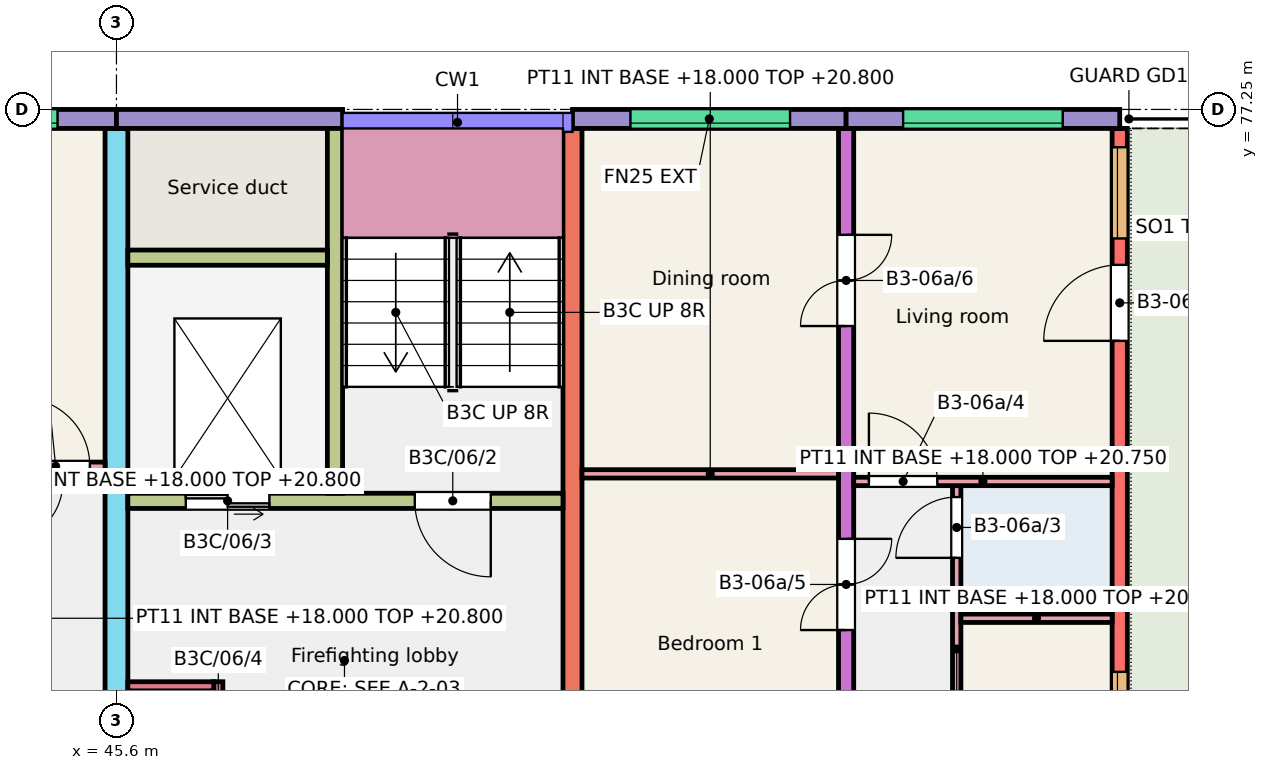
"""IFC4 building model, lengths in metres.
Left out: names, types, materials, properties, quantities, classifications, styles, units other than length and angle.
Written with IfcOpenShell. Run it as: python <this file> out.ifc"""

import sys

from ifc_helpers import new_model, si_unit, direction, frame, frame_2d, origin, place, context, subcontext, project, spatial, rectangle, extrude, element, fill, save


model = new_model("IFC4")
c1 = context("Model", 3, precision=1e-05, world=origin(), true_north=direction((0.0, 1.0)))
c2 = subcontext(c1, "Body", "Model", "MODEL_VIEW")
j1 = project(units=[si_unit("LENGTHUNIT", "METRE"), si_unit("PLANEANGLEUNIT", "RADIAN")], contexts=[c1])
p1 = place(None, origin())
s1 = spatial("IfcSite", under=j1, at=p1, CompositionType="ELEMENT")
p2 = place(p1, origin())
s2 = spatial("IfcBuilding", under=s1, at=p2, CompositionType="ELEMENT")
p3 = place(p2, frame((0.0, 0.0, 18.0)))
s3 = spatial("IfcBuildingStorey", under=s2, at=p3, CompositionType="ELEMENT", Elevation=18.0)
p4 = place(p3, frame((45.6, 66.0, 0.0), z_axis=(0.0, 0.0, 1.0), x_axis=(0.0, 1.0, 0.0)))
e1 = element("IfcWall", 1, at=p4, inside=s3, PredefinedType="SHEAR", context=c2, shape_type="SweptSolid", body=[
    extrude(rectangle(XDim=11.0, YDim=0.3, at=frame_2d((5.5, 0.0))), origin(), (0.0, 0.0, 1.0), 3.0),
])
p5 = place(p4, frame((0.3, 0.0, 0.0)))
e2 = element("IfcOpeningElement", 2, at=p5, cuts=e1, PredefinedType="OPENING", context=c2, shape_type="SweptSolid", body=[
    extrude(rectangle(XDim=1.2, YDim=2.1, at=frame_2d((0.6, 1.05))), frame((0.0, 0.16, 0.0), z_axis=(0.0, -1.0, 0.0), x_axis=(1.0, 0.0, 0.0)), (0.0, 0.0, 1.0), 0.32),
])
p6 = place(p3, frame((51.6, 68.0, 0.0), z_axis=(0.0, 0.0, 1.0), x_axis=(0.0, 1.0, 0.0)))
e3 = element("IfcWall", 3, at=p6, inside=s3, PredefinedType="SHEAR", context=c2, shape_type="SweptSolid", body=[
    extrude(rectangle(XDim=9.0, YDim=0.25, at=frame_2d((4.5, 0.0))), origin(), (0.0, 0.0, 1.0), 3.0),
])
p7 = place(p3, frame((55.2, 68.0, 0.0), z_axis=(0.0, 0.0, 1.0), x_axis=(0.0, 1.0, 0.0)))
e4 = element("IfcWall", 4, at=p7, inside=s3, PredefinedType="SHEAR", context=c2, shape_type="SweptSolid", body=[
    extrude(rectangle(XDim=9.0, YDim=0.2, at=frame_2d((4.5, 0.0))), origin(), (0.0, 0.0, 1.0), 3.0),
])
p8 = place(p7, frame((2.4, 0.0, 0.0)))
e5 = element("IfcOpeningElement", 5, at=p8, cuts=e4, PredefinedType="OPENING", context=c2, shape_type="SweptSolid", body=[
    extrude(rectangle(XDim=1.2, YDim=2.1, at=frame_2d((0.6, 1.05))), frame((0.0, 0.11, 0.0), z_axis=(0.0, -1.0, 0.0), x_axis=(1.0, 0.0, 0.0)), (0.0, 0.0, 1.0), 0.22),
])
p9 = place(p7, frame((6.4, 0.0, 0.0)))
e6 = element("IfcOpeningElement", 6, at=p9, cuts=e4, PredefinedType="OPENING", context=c2, shape_type="SweptSolid", body=[
    extrude(rectangle(XDim=1.2, YDim=2.1, at=frame_2d((0.6, 1.05))), frame((0.0, 0.11, 0.0), z_axis=(0.0, -1.0, 0.0), x_axis=(1.0, 0.0, 0.0)), (0.0, 0.0, 1.0), 0.22),
])
p10 = place(p3, frame((58.8, 68.0, 0.0), z_axis=(0.0, 0.0, 1.0), x_axis=(0.0, 1.0, 0.0)))
e7 = element("IfcWall", 7, at=p10, inside=s3, PredefinedType="SHEAR", context=c2, shape_type="SweptSolid", body=[
    extrude(rectangle(XDim=9.0, YDim=0.2, at=frame_2d((4.5, 0.0))), origin(), (0.0, 0.0, 1.0), 3.0),
])
p11 = place(p10, frame((0.65, 0.0, 0.9)))
e8 = element("IfcOpeningElement", 8, at=p11, cuts=e7, PredefinedType="OPENING", context=c2, shape_type="SweptSolid", body=[
    extrude(rectangle(XDim=1.2, YDim=1.5, at=frame_2d((0.6, 0.75))), frame((0.0, 0.11, 0.0), z_axis=(0.0, -1.0, 0.0), x_axis=(1.0, 0.0, 0.0)), (0.0, 0.0, 1.0), 0.22),
])
p12 = place(p10, frame((7.552, 0.0, 0.9)))
e9 = element("IfcOpeningElement", 9, at=p12, cuts=e7, PredefinedType="OPENING", context=c2, shape_type="SweptSolid", body=[
    extrude(rectangle(XDim=1.2, YDim=1.5, at=frame_2d((0.6, 0.75))), frame((0.0, 0.11, 0.0), z_axis=(0.0, -1.0, 0.0), x_axis=(1.0, 0.0, 0.0)), (0.0, 0.0, 1.0), 0.22),
])
p13 = place(p10, frame((6.205, 0.0, 0.0)))
e10 = element("IfcOpeningElement", 10, at=p13, cuts=e7, PredefinedType="OPENING", context=c2, shape_type="SweptSolid", body=[
    extrude(rectangle(XDim=1.0, YDim=2.1, at=frame_2d((0.5, 1.05))), frame((0.0, 0.11, 0.0), z_axis=(0.0, -1.0, 0.0), x_axis=(1.0, 0.0, 0.0)), (0.0, 0.0, 1.0), 0.22),
])
p14 = place(p3, frame((42.0, 77.125, 0.0), z_axis=(0.0, 0.0, 1.0), x_axis=(1.0, 0.0, 0.0)))
e11 = element("IfcWall", 11, at=p14, inside=s3, PredefinedType="SOLIDWALL", context=c2, shape_type="SweptSolid", body=[
    extrude(rectangle(XDim=3.6, YDim=0.25, at=frame_2d((1.8, 0.0))), origin(), (0.0, 0.0, 1.0), 3.0),
])
p15 = place(p14, frame((0.725, 0.0, 1.2)))
e12 = element("IfcOpeningElement", 12, at=p15, cuts=e11, PredefinedType="OPENING", context=c2, shape_type="SweptSolid", body=[
    extrude(rectangle(XDim=2.1, YDim=1.2, at=frame_2d((1.05, 0.6))), frame((0.0, 0.135, 0.0), z_axis=(0.0, -1.0, 0.0), x_axis=(1.0, 0.0, 0.0)), (0.0, 0.0, 1.0), 0.27),
])
p16 = place(p3, frame((45.6, 77.125, 0.0), z_axis=(0.0, 0.0, 1.0), x_axis=(1.0, 0.0, 0.0)))
e13 = element("IfcWall", 13, at=p16, inside=s3, PredefinedType="SOLIDWALL", context=c2, shape_type="SweptSolid", body=[
    extrude(rectangle(XDim=2.975, YDim=0.25, at=frame_2d((1.487, 0.0))), origin(), (0.0, 0.0, 1.0), 3.0),
])
p17 = place(p3, frame((45.75, 72.1, 0.0), z_axis=(0.0, 0.0, 1.0), x_axis=(1.0, 0.0, 0.0)))
e14 = element("IfcWall", 14, at=p17, inside=s3, PredefinedType="SHEAR", context=c2, shape_type="SweptSolid", body=[
    extrude(rectangle(XDim=5.725, YDim=0.2, at=frame_2d((2.863, 0.0))), origin(), (0.0, 0.0, 1.0), 3.0),
])
p18 = place(p17, frame((3.775, 0.0, 0.0)))
e15 = element("IfcOpeningElement", 15, at=p18, cuts=e14, PredefinedType="OPENING", context=c2, shape_type="SweptSolid", body=[
    extrude(rectangle(XDim=1.0, YDim=2.1, at=frame_2d((0.5, 1.05))), frame((0.0, 0.11, 0.0), z_axis=(0.0, -1.0, 0.0), x_axis=(1.0, 0.0, 0.0)), (0.0, 0.0, 1.0), 0.22),
])
p19 = place(p17, frame((0.762, 0.0, 0.0)))
e16 = element("IfcOpeningElement", 16, at=p19, cuts=e14, PredefinedType="OPENING", context=c2, shape_type="SweptSolid", body=[
    extrude(rectangle(XDim=1.1, YDim=2.1, at=frame_2d((0.55, 1.05))), frame((0.0, 0.11, 0.0), z_axis=(0.0, -1.0, 0.0), x_axis=(1.0, 0.0, 0.0)), (0.0, 0.0, 1.0), 0.22),
])
p20 = place(p3, frame((48.475, 72.2, 0.0), z_axis=(0.0, 0.0, 1.0), x_axis=(0.0, 1.0, 0.0)))
e17 = element("IfcWall", 17, at=p20, inside=s3, PredefinedType="SHEAR", context=c2, shape_type="SweptSolid", body=[
    extrude(rectangle(XDim=4.8, YDim=0.2, at=frame_2d((2.4, 0.0))), origin(), (0.0, 0.0, 1.0), 3.0),
])
p21 = place(p3, frame((45.75, 75.3, 0.0), z_axis=(0.0, 0.0, 1.0), x_axis=(1.0, 0.0, 0.0)))
e18 = element("IfcWall", 18, at=p21, inside=s3, PredefinedType="SHEAR", context=c2, shape_type="SweptSolid", body=[
    extrude(rectangle(XDim=2.625, YDim=0.2, at=frame_2d((1.312, 0.0))), origin(), (0.0, 0.0, 1.0), 3.0),
])
p22 = place(p3, frame((46.94, 68.0, 0.0), z_axis=(0.0, 0.0, 1.0), x_axis=(0.0, 1.0, 0.0)))
e19 = element("IfcWall", 19, at=p22, inside=s3, PredefinedType="SHEAR", context=c2, shape_type="SweptSolid", body=[
    extrude(rectangle(XDim=1.72, YDim=0.12, at=frame_2d((0.86, 0.0))), origin(), (0.0, 0.0, 1.0), 3.0),
])
p23 = place(p22, frame((0.45, 0.0, 0.0)))
e20 = element("IfcOpeningElement", 20, at=p23, cuts=e19, PredefinedType="OPENING", context=c2, shape_type="SweptSolid", body=[
    extrude(rectangle(XDim=0.9, YDim=2.1, at=frame_2d((0.45, 1.05))), frame((0.0, 0.07, 0.0), z_axis=(0.0, -1.0, 0.0), x_axis=(1.0, 0.0, 0.0)), (0.0, 0.0, 1.0), 0.14),
])
p24 = place(p3, frame((45.75, 69.66, 0.0), z_axis=(0.0, 0.0, 1.0), x_axis=(1.0, 0.0, 0.0)))
e21 = element("IfcWall", 21, at=p24, inside=s3, PredefinedType="SHEAR", context=c2, shape_type="SweptSolid", body=[
    extrude(rectangle(XDim=1.13, YDim=0.12, at=frame_2d((0.565, 0.0))), origin(), (0.0, 0.0, 1.0), 3.0),
])
p25 = place(p3, frame((51.6, 77.125, 0.0), z_axis=(0.0, 0.0, 1.0), x_axis=(1.0, 0.0, 0.0)))
e22 = element("IfcWall", 22, at=p25, inside=s3, PredefinedType="SOLIDWALL", context=c2, shape_type="SweptSolid", body=[
    extrude(rectangle(XDim=3.6, YDim=0.25, at=frame_2d((1.8, 0.0))), origin(), (0.0, 0.0, 1.0), 3.0),
])
p26 = place(p25, frame((0.762, 0.0, 1.2)))
e23 = element("IfcOpeningElement", 23, at=p26, cuts=e22, PredefinedType="OPENING", context=c2, shape_type="SweptSolid", body=[
    extrude(rectangle(XDim=2.1, YDim=1.2, at=frame_2d((1.05, 0.6))), frame((0.0, 0.135, 0.0), z_axis=(0.0, -1.0, 0.0), x_axis=(1.0, 0.0, 0.0)), (0.0, 0.0, 1.0), 0.27),
])
p27 = place(p3, frame((55.2, 77.125, 0.0), z_axis=(0.0, 0.0, 1.0), x_axis=(1.0, 0.0, 0.0)))
e24 = element("IfcWall", 24, at=p27, inside=s3, PredefinedType="SOLIDWALL", context=c2, shape_type="SweptSolid", body=[
    extrude(rectangle(XDim=3.6, YDim=0.25, at=frame_2d((1.8, 0.0))), origin(), (0.0, 0.0, 1.0), 3.0),
])
p28 = place(p27, frame((0.75, 0.0, 1.2)))
e25 = element("IfcOpeningElement", 25, at=p28, cuts=e24, PredefinedType="OPENING", context=c2, shape_type="SweptSolid", body=[
    extrude(rectangle(XDim=2.1, YDim=1.2, at=frame_2d((1.05, 0.6))), frame((0.0, 0.135, 0.0), z_axis=(0.0, -1.0, 0.0), x_axis=(1.0, 0.0, 0.0)), (0.0, 0.0, 1.0), 0.27),
])
p29 = place(p3, frame((42.1, 72.555, 0.0), z_axis=(0.0, 0.0, 1.0), x_axis=(1.0, 0.0, 0.0)))
e26 = element("IfcWall", 26, at=p29, inside=s3, PredefinedType="PARTITIONING", context=c2, shape_type="SweptSolid", body=[
    extrude(rectangle(XDim=3.35, YDim=0.11, at=frame_2d((1.675, 0.0))), origin(), (0.0, 0.0, 1.0), 2.8),
])
p30 = place(p29, frame((2.25, 0.0, 0.0)))
e27 = element("IfcOpeningElement", 27, at=p30, cuts=e26, PredefinedType="OPENING", context=c2, shape_type="SweptSolid", body=[
    extrude(rectangle(XDim=0.9, YDim=2.1, at=frame_2d((0.45, 1.05))), frame((0.0, 0.065, 0.0), z_axis=(0.0, -1.0, 0.0), x_axis=(1.0, 0.0, 0.0)), (0.0, 0.0, 1.0), 0.13),
])
p31 = place(p3, frame((56.655, 68.0, 0.0), z_axis=(0.0, 0.0, 1.0), x_axis=(0.0, 1.0, 0.0)))
e28 = element("IfcWall", 28, at=p31, inside=s3, PredefinedType="PARTITIONING", context=c2, shape_type="SweptSolid", body=[
    extrude(rectangle(XDim=4.3, YDim=0.11, at=frame_2d((2.15, 0.0))), origin(), (0.0, 0.0, 1.0), 2.75),
])
p32 = place(p31, frame((0.2, 0.0, 0.0)))
e29 = element("IfcOpeningElement", 29, at=p32, cuts=e28, PredefinedType="OPENING", context=c2, shape_type="SweptSolid", body=[
    extrude(rectangle(XDim=0.8, YDim=2.1, at=frame_2d((0.4, 1.05))), frame((0.0, 0.065, 0.0), z_axis=(0.0, -1.0, 0.0), x_axis=(1.0, 0.0, 0.0)), (0.0, 0.0, 1.0), 0.13),
])
p33 = place(p31, frame((3.35, 0.0, 0.0)))
e30 = element("IfcOpeningElement", 30, at=p33, cuts=e28, PredefinedType="OPENING", context=c2, shape_type="SweptSolid", body=[
    extrude(rectangle(XDim=0.8, YDim=2.1, at=frame_2d((0.4, 1.05))), frame((0.0, 0.065, 0.0), z_axis=(0.0, -1.0, 0.0), x_axis=(1.0, 0.0, 0.0)), (0.0, 0.0, 1.0), 0.13),
])
p34 = place(p3, frame((56.71, 70.555, 0.0), z_axis=(0.0, 0.0, 1.0), x_axis=(1.0, 0.0, 0.0)))
e31 = element("IfcWall", 31, at=p34, inside=s3, PredefinedType="PARTITIONING", context=c2, shape_type="SweptSolid", body=[
    extrude(rectangle(XDim=1.99, YDim=0.11, at=frame_2d((0.995, 0.0))), origin(), (0.0, 0.0, 1.0), 2.75),
])
p35 = place(p3, frame((55.3, 72.355, 0.0), z_axis=(0.0, 0.0, 1.0), x_axis=(1.0, 0.0, 0.0)))
e32 = element("IfcWall", 32, at=p35, inside=s3, PredefinedType="PARTITIONING", context=c2, shape_type="SweptSolid", body=[
    extrude(rectangle(XDim=3.4, YDim=0.11, at=frame_2d((1.7, 0.0))), origin(), (0.0, 0.0, 1.0), 2.75),
])
p36 = place(p35, frame((0.2, 0.0, 0.0)))
e33 = element("IfcOpeningElement", 33, at=p36, cuts=e32, PredefinedType="OPENING", context=c2, shape_type="SweptSolid", body=[
    extrude(rectangle(XDim=0.9, YDim=2.1, at=frame_2d((0.45, 1.05))), frame((0.0, 0.065, 0.0), z_axis=(0.0, -1.0, 0.0), x_axis=(1.0, 0.0, 0.0)), (0.0, 0.0, 1.0), 0.13),
])
p37 = place(p3, frame((51.725, 72.455, 0.0), z_axis=(0.0, 0.0, 1.0), x_axis=(1.0, 0.0, 0.0)))
e34 = element("IfcWall", 34, at=p37, inside=s3, PredefinedType="PARTITIONING", context=c2, shape_type="SweptSolid", body=[
    extrude(rectangle(XDim=3.375, YDim=0.11, at=frame_2d((1.688, 0.0))), origin(), (0.0, 0.0, 1.0), 2.8),
])
p38 = place(p15, origin())
e35 = element("IfcWindow", 35, at=p38, inside=s3, PartitioningType="SINGLE_PANEL", PredefinedType="WINDOW", context=c2, shape_type="SweptSolid", body=[
    extrude(rectangle(XDim=2.1, YDim=1.2, at=frame_2d((1.05, 0.6))), frame((0.0, -0.025, 0.0), z_axis=(0.0, -1.0, 0.0), x_axis=(1.0, 0.0, 0.0)), (0.0, 0.0, 1.0), 0.06),
])
fill(e12, e35)
p39 = place(p26, origin())
e36 = element("IfcWindow", 36, at=p39, inside=s3, PartitioningType="SINGLE_PANEL", PredefinedType="WINDOW", context=c2, shape_type="SweptSolid", body=[
    extrude(rectangle(XDim=2.1, YDim=1.2, at=frame_2d((1.05, 0.6))), frame((0.0, -0.025, 0.0), z_axis=(0.0, -1.0, 0.0), x_axis=(1.0, 0.0, 0.0)), (0.0, 0.0, 1.0), 0.06),
])
fill(e23, e36)
p40 = place(p28, origin())
e37 = element("IfcWindow", 37, at=p40, inside=s3, PartitioningType="SINGLE_PANEL", PredefinedType="WINDOW", context=c2, shape_type="SweptSolid", body=[
    extrude(rectangle(XDim=2.1, YDim=1.2, at=frame_2d((1.05, 0.6))), frame((0.0, -0.025, 0.0), z_axis=(0.0, -1.0, 0.0), x_axis=(1.0, 0.0, 0.0)), (0.0, 0.0, 1.0), 0.06),
])
fill(e25, e37)
p41 = place(p11, origin())
e38 = element("IfcWindow", 38, at=p41, inside=s3, PartitioningType="SINGLE_PANEL", PredefinedType="WINDOW", context=c2, shape_type="SweptSolid", body=[
    extrude(rectangle(XDim=1.2, YDim=1.5, at=frame_2d((0.6, 0.75))), frame((0.0, 0.06, 0.0), z_axis=(0.0, -1.0, 0.0), x_axis=(1.0, 0.0, 0.0)), (0.0, 0.0, 1.0), 0.06),
])
fill(e8, e38)
p42 = place(p12, origin())
e39 = element("IfcWindow", 39, at=p42, inside=s3, PartitioningType="SINGLE_PANEL", PredefinedType="WINDOW", context=c2, shape_type="SweptSolid", body=[
    extrude(rectangle(XDim=1.2, YDim=1.5, at=frame_2d((0.6, 0.75))), frame((0.0, 0.06, 0.0), z_axis=(0.0, -1.0, 0.0), x_axis=(1.0, 0.0, 0.0)), (0.0, 0.0, 1.0), 0.06),
])
fill(e9, e39)
p43 = place(p30, origin())
e40 = element("IfcDoor", 40, at=p43, inside=s3, OperationType="SINGLE_SWING_LEFT", PredefinedType="DOOR", context=c2, shape_type="SweptSolid", body=[
    extrude(rectangle(XDim=0.9, YDim=2.1, at=frame_2d((0.45, 1.05))), frame((0.0, 0.025, 0.0), z_axis=(0.0, -1.0, 0.0), x_axis=(1.0, 0.0, 0.0)), (0.0, 0.0, 1.0), 0.05),
])
fill(e27, e40)
p44 = place(p33, origin())
e41 = element("IfcDoor", 41, at=p44, inside=s3, OperationType="SINGLE_SWING_LEFT", PredefinedType="DOOR", context=c2, shape_type="SweptSolid", body=[
    extrude(rectangle(XDim=0.8, YDim=2.1, at=frame_2d((0.4, 1.05))), frame((0.0, 0.025, 0.0), z_axis=(0.0, -1.0, 0.0), x_axis=(1.0, 0.0, 0.0)), (0.0, 0.0, 1.0), 0.05),
])
fill(e30, e41)
p45 = place(p36, origin())
e42 = element("IfcDoor", 42, at=p45, inside=s3, OperationType="SINGLE_SWING_LEFT", PredefinedType="DOOR", context=c2, shape_type="SweptSolid", body=[
    extrude(rectangle(XDim=0.9, YDim=2.1, at=frame_2d((0.45, 1.05))), frame((0.0, 0.025, 0.0), z_axis=(0.0, -1.0, 0.0), x_axis=(1.0, 0.0, 0.0)), (0.0, 0.0, 1.0), 0.05),
])
fill(e33, e42)
p46 = place(p8, origin())
e43 = element("IfcDoor", 43, at=p46, inside=s3, OperationType="DOUBLE_DOOR_SINGLE_SWING", PredefinedType="DOOR", context=c2, shape_type="SweptSolid", body=[
    extrude(rectangle(XDim=1.2, YDim=2.1, at=frame_2d((0.6, 1.05))), frame((0.0, 0.025, 0.0), z_axis=(0.0, -1.0, 0.0), x_axis=(1.0, 0.0, 0.0)), (0.0, 0.0, 1.0), 0.05),
])
fill(e5, e43)
p47 = place(p9, origin())
e44 = element("IfcDoor", 44, at=p47, inside=s3, OperationType="DOUBLE_DOOR_SINGLE_SWING", PredefinedType="DOOR", context=c2, shape_type="SweptSolid", body=[
    extrude(rectangle(XDim=1.2, YDim=2.1, at=frame_2d((0.6, 1.05))), frame((0.0, 0.025, 0.0), z_axis=(0.0, -1.0, 0.0), x_axis=(1.0, 0.0, 0.0)), (0.0, 0.0, 1.0), 0.05),
])
fill(e6, e44)
p48 = place(p13, origin())
e45 = element("IfcDoor", 45, at=p48, inside=s3, OperationType="SINGLE_SWING_LEFT", PredefinedType="DOOR", context=c2, shape_type="SweptSolid", body=[
    extrude(rectangle(XDim=1.0, YDim=2.1, at=frame_2d((0.5, 1.05))), frame((0.0, 0.025, 0.0), z_axis=(0.0, -1.0, 0.0), x_axis=(1.0, 0.0, 0.0)), (0.0, 0.0, 1.0), 0.05),
])
fill(e10, e45)
p49 = place(p18, origin())
e46 = element("IfcDoor", 46, at=p49, inside=s3, OperationType="SINGLE_SWING_RIGHT", PredefinedType="DOOR", context=c2, shape_type="SweptSolid", body=[
    extrude(rectangle(XDim=1.0, YDim=2.1, at=frame_2d((0.5, 1.05))), frame((0.0, 0.025, 0.0), z_axis=(0.0, -1.0, 0.0), x_axis=(1.0, 0.0, 0.0)), (0.0, 0.0, 1.0), 0.05),
])
fill(e15, e46)
p50 = place(p19, origin())
e47 = element("IfcDoor", 47, at=p50, inside=s3, OperationType="DOUBLE_DOOR_SLIDING", PredefinedType="DOOR", context=c2, shape_type="SweptSolid", body=[
    extrude(rectangle(XDim=1.1, YDim=2.1, at=frame_2d((0.55, 1.05))), frame((0.0, 0.025, 0.0), z_axis=(0.0, -1.0, 0.0), x_axis=(1.0, 0.0, 0.0)), (0.0, 0.0, 1.0), 0.05),
])
fill(e16, e47)
save(model, sys.argv[1])
